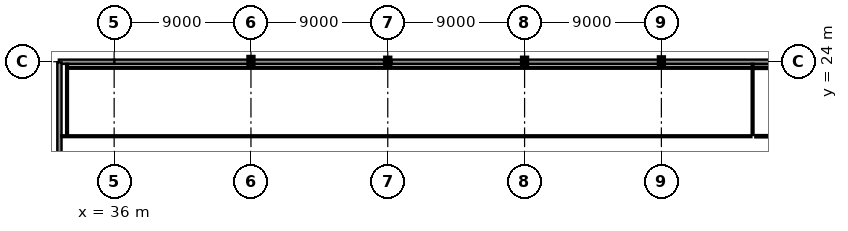
"""IFC4 building model, lengths in metres.
Left out: names, types, materials, properties, quantities, classifications, styles, units other than length and angle.
Written with IfcOpenShell. Run it as: python <this file> out.ifc"""

import sys

from ifc_helpers import new_model, si_unit, direction, frame, frame_2d, origin, origin_2d, place, context, subcontext, project, spatial, rectangle, i_section, extrude, element, fill, save


model = new_model("IFC4")
c1 = context("Model", 3, precision=1e-05, world=origin(), true_north=direction((0.0, 1.0)))
c2 = subcontext(c1, "Body", "Model", "MODEL_VIEW")
j1 = project(units=[si_unit("LENGTHUNIT", "METRE"), si_unit("PLANEANGLEUNIT", "RADIAN")], contexts=[c1])
p1 = place(None, origin())
s1 = spatial("IfcSite", under=j1, at=p1, CompositionType="ELEMENT")
p2 = place(p1, origin())
s2 = spatial("IfcBuilding", under=s1, at=p2, CompositionType="ELEMENT")
p3 = place(p2, frame((0.0, 0.0, 27.4)))
s3 = spatial("IfcBuildingStorey", under=s2, at=p3, CompositionType="ELEMENT", Elevation=27.4)
p4 = place(p3, frame((45.0, 24.0, 0.0), z_axis=(0.0, 0.0, 1.0), x_axis=(1.0, 0.0, 0.0)))
e1 = element("IfcColumn", 1, at=p4, inside=s3, PredefinedType="COLUMN", context=c2, shape_type="SweptSolid", body=[
    extrude(i_section(OverallWidth=0.3, OverallDepth=0.6, WebThickness=0.015, FlangeThickness=0.03, at=origin_2d()), origin(), (0.0, 0.0, 1.0), 4.0),
])
for number, where, z_axis, x_axis in (
    (2, (54.0, 24.0, 0.0), (0.0, 0.0, 1.0), (0.0, 1.0, 0.0)),
    (3, (63.0, 24.0, 0.0), (0.0, 0.0, 1.0), (1.0, 0.0, 0.0)),
):
    element("IfcColumn", number, at=place(p3, frame(where, z_axis=z_axis, x_axis=x_axis)), inside=s3, PredefinedType="COLUMN", context=c2, shape_type="SweptSolid", body=[
        extrude(i_section(OverallWidth=0.3, OverallDepth=0.5, WebThickness=0.014, FlangeThickness=0.028, at=origin_2d()), origin(), (0.0, 0.0, 1.0), 4.0),
    ])
p5 = place(p3, frame((72.0, 24.0, 0.0), z_axis=(0.0, 0.0, 1.0), x_axis=(1.0, 0.0, 0.0)))
e4 = element("IfcColumn", 4, at=p5, inside=s3, PredefinedType="COLUMN", context=c2, shape_type="SweptSolid", body=[
    extrude(i_section(OverallWidth=0.3, OverallDepth=0.55, WebThickness=0.015, FlangeThickness=0.029, at=origin_2d()), origin(), (0.0, 0.0, 1.0), 4.0),
])
p6 = place(p3, frame((80.942, 24.0, 0.0), z_axis=(0.0, 0.0, 1.0), x_axis=(-1.0, 0.0, 0.0)))
e5 = element("IfcWall", 5, at=p6, inside=s3, PredefinedType="SOLIDWALL", context=c2, shape_type="SweptSolid", body=[
    extrude(rectangle(XDim=8.934, YDim=0.28, at=frame_2d((4.467, 0.0))), origin(), (0.0, 0.0, 1.0), 3.305),
])
p7 = place(p6, frame((1.302, 0.0, 1.05)))
e6 = element("IfcOpeningElement", 6, at=p7, cuts=e5, PredefinedType="OPENING", context=c2, shape_type="SweptSolid", body=[
    extrude(rectangle(XDim=1.3, YDim=1.3, at=frame_2d((0.65, 0.65))), frame((0.0, 0.155, 0.0), z_axis=(0.0, -1.0, 0.0), x_axis=(1.0, 0.0, 0.0)), (0.0, 0.0, 1.0), 0.31),
])
p8 = place(p6, frame((5.604, 0.0, 1.05)))
e7 = element("IfcOpeningElement", 7, at=p8, cuts=e5, PredefinedType="OPENING", context=c2, shape_type="SweptSolid", body=[
    extrude(rectangle(XDim=1.3, YDim=1.3, at=frame_2d((0.65, 0.65))), frame((0.0, 0.155, 0.0), z_axis=(0.0, -1.0, 0.0), x_axis=(1.0, 0.0, 0.0)), (0.0, 0.0, 1.0), 0.31),
])
p9 = place(p3, frame((71.992, 24.0, 0.0), z_axis=(0.0, 0.0, 1.0), x_axis=(-1.0, 0.0, 0.0)))
e8 = element("IfcWall", 8, at=p9, inside=s3, PredefinedType="SOLIDWALL", context=c2, shape_type="SweptSolid", body=[
    extrude(rectangle(XDim=8.984, YDim=0.28, at=frame_2d((4.492, 0.0))), origin(), (0.0, 0.0, 1.0), 2.787),
])
p10 = place(p9, frame((2.045, 0.0, 1.05)))
e9 = element("IfcOpeningElement", 9, at=p10, cuts=e8, PredefinedType="OPENING", context=c2, shape_type="SweptSolid", body=[
    extrude(rectangle(XDim=1.3, YDim=1.3, at=frame_2d((0.65, 0.65))), frame((0.0, 0.155, 0.0), z_axis=(0.0, -1.0, 0.0), x_axis=(1.0, 0.0, 0.0)), (0.0, 0.0, 1.0), 0.31),
])
p11 = place(p9, frame((5.639, 0.0, 1.05)))
e10 = element("IfcOpeningElement", 10, at=p11, cuts=e8, PredefinedType="OPENING", context=c2, shape_type="SweptSolid", body=[
    extrude(rectangle(XDim=1.3, YDim=1.3, at=frame_2d((0.65, 0.65))), frame((0.0, 0.155, 0.0), z_axis=(0.0, -1.0, 0.0), x_axis=(1.0, 0.0, 0.0)), (0.0, 0.0, 1.0), 0.31),
])
p12 = place(p3, frame((62.992, 24.0, 0.0), z_axis=(0.0, 0.0, 1.0), x_axis=(-1.0, 0.0, 0.0)))
e11 = element("IfcWall", 11, at=p12, inside=s3, PredefinedType="SOLIDWALL", context=c2, shape_type="SweptSolid", body=[
    extrude(rectangle(XDim=8.744, YDim=0.28, at=frame_2d((4.372, 0.0))), origin(), (0.0, 0.0, 1.0), 2.787),
])
p13 = place(p12, frame((1.973, 0.0, 1.05)))
e12 = element("IfcOpeningElement", 12, at=p13, cuts=e11, PredefinedType="OPENING", context=c2, shape_type="SweptSolid", body=[
    extrude(rectangle(XDim=1.3, YDim=1.3, at=frame_2d((0.65, 0.65))), frame((0.0, 0.155, 0.0), z_axis=(0.0, -1.0, 0.0), x_axis=(1.0, 0.0, 0.0)), (0.0, 0.0, 1.0), 0.31),
])
p14 = place(p12, frame((5.471, 0.0, 1.05)))
e13 = element("IfcOpeningElement", 13, at=p14, cuts=e11, PredefinedType="OPENING", context=c2, shape_type="SweptSolid", body=[
    extrude(rectangle(XDim=1.3, YDim=1.3, at=frame_2d((0.65, 0.65))), frame((0.0, 0.155, 0.0), z_axis=(0.0, -1.0, 0.0), x_axis=(1.0, 0.0, 0.0)), (0.0, 0.0, 1.0), 0.31),
])
p15 = place(p3, frame((53.752, 24.0, 0.0), z_axis=(0.0, 0.0, 1.0), x_axis=(-1.0, 0.0, 0.0)))
e14 = element("IfcWall", 14, at=p15, inside=s3, PredefinedType="SOLIDWALL", context=c2, shape_type="SweptSolid", body=[
    extrude(rectangle(XDim=8.744, YDim=0.28, at=frame_2d((4.372, 0.0))), origin(), (0.0, 0.0, 1.0), 2.787),
])
p16 = place(p15, frame((1.973, 0.0, 1.05)))
e15 = element("IfcOpeningElement", 15, at=p16, cuts=e14, PredefinedType="OPENING", context=c2, shape_type="SweptSolid", body=[
    extrude(rectangle(XDim=1.3, YDim=1.3, at=frame_2d((0.65, 0.65))), frame((0.0, 0.155, 0.0), z_axis=(0.0, -1.0, 0.0), x_axis=(1.0, 0.0, 0.0)), (0.0, 0.0, 1.0), 0.31),
])
p17 = place(p15, frame((5.471, 0.0, 1.05)))
e16 = element("IfcOpeningElement", 16, at=p17, cuts=e14, PredefinedType="OPENING", context=c2, shape_type="SweptSolid", body=[
    extrude(rectangle(XDim=1.3, YDim=1.3, at=frame_2d((0.65, 0.65))), frame((0.0, 0.155, 0.0), z_axis=(0.0, -1.0, 0.0), x_axis=(1.0, 0.0, 0.0)), (0.0, 0.0, 1.0), 0.31),
])
p18 = place(p3, frame((44.992, 24.0, 0.0), z_axis=(0.0, 0.0, 1.0), x_axis=(-1.0, 0.0, 0.0)))
e17 = element("IfcWall", 17, at=p18, inside=s3, PredefinedType="SOLIDWALL", context=c2, shape_type="SweptSolid", body=[
    extrude(rectangle(XDim=9.002, YDim=0.28, at=frame_2d((4.501, 0.0))), origin(), (0.0, 0.0, 1.0), 2.787),
])
p19 = place(p3, frame((36.01, 24.0, 0.0), z_axis=(0.0, 0.0, 1.0), x_axis=(-1.0, 0.0, 0.0)))
e18 = element("IfcWall", 18, at=p19, inside=s3, PredefinedType="SOLIDWALL", context=c2, shape_type="SweptSolid", body=[
    extrude(rectangle(XDim=3.65, YDim=0.28, at=frame_2d((1.825, 0.0))), origin(), (0.0, 0.0, 1.0), 2.787),
])
p20 = place(p3, frame((32.4, 23.96, 0.0), z_axis=(0.0, 0.0, 1.0), x_axis=(0.0, -1.0, 0.0)))
e19 = element("IfcWall", 19, at=p20, inside=s3, PredefinedType="SOLIDWALL", context=c2, shape_type="SweptSolid", body=[
    extrude(rectangle(XDim=11.97, YDim=0.28, at=frame_2d((5.985, 0.0))), origin(), (0.0, 0.0, 1.0), 3.095),
])
p21 = place(p20, frame((2.941, 0.0, 1.05)))
e20 = element("IfcOpeningElement", 20, at=p21, cuts=e19, PredefinedType="OPENING", context=c2, shape_type="SweptSolid", body=[
    extrude(rectangle(XDim=1.3, YDim=1.3, at=frame_2d((0.65, 0.65))), frame((0.0, 0.155, 0.0), z_axis=(0.0, -1.0, 0.0), x_axis=(1.0, 0.0, 0.0)), (0.0, 0.0, 1.0), 0.31),
])
p22 = place(p20, frame((8.5, 0.0, 1.05)))
e21 = element("IfcOpeningElement", 21, at=p22, cuts=e19, PredefinedType="OPENING", context=c2, shape_type="SweptSolid", body=[
    extrude(rectangle(XDim=1.3, YDim=1.3, at=frame_2d((0.65, 0.65))), frame((0.0, 0.155, 0.0), z_axis=(0.0, -1.0, 0.0), x_axis=(1.0, 0.0, 0.0)), (0.0, 0.0, 1.0), 0.31),
])
p23 = place(p3, frame((77.92, 19.1, 0.0), z_axis=(0.0, 0.0, 1.0), x_axis=(-1.0, 0.0, 0.0)))
e22 = element("IfcWall", 22, at=p23, inside=s3, PredefinedType="PARTITIONING", context=c2, shape_type="SweptSolid", body=[
    extrude(rectangle(XDim=45.385, YDim=0.12, at=frame_2d((22.692, 0.0))), origin(), (0.0, 0.0, 1.0), 3.64),
])
p24 = place(p23, frame((22.218, 0.0, 0.0)))
e23 = element("IfcOpeningElement", 23, at=p24, cuts=e22, PredefinedType="OPENING", context=c2, shape_type="SweptSolid", body=[
    extrude(rectangle(XDim=0.95, YDim=2.15, at=frame_2d((0.475, 1.075))), frame((0.0, 0.075, 0.0), z_axis=(0.0, -1.0, 0.0), x_axis=(1.0, 0.0, 0.0)), (0.0, 0.0, 1.0), 0.15),
])
p25 = place(p3, frame((32.9, 19.155, 0.0), z_axis=(0.0, 0.0, 1.0), x_axis=(0.0, 1.0, 0.0)))
e24 = element("IfcWall", 24, at=p25, inside=s3, PredefinedType="PARTITIONING", context=c2, shape_type="SweptSolid", body=[
    extrude(rectangle(XDim=4.71, YDim=0.12, at=frame_2d((2.355, 0.0))), origin(), (0.0, 0.0, 1.0), 3.64),
])
p26 = place(p3, frame((32.955, 23.6, 0.0), z_axis=(0.0, 0.0, 1.0), x_axis=(1.0, 0.0, 0.0)))
e25 = element("IfcWall", 25, at=p26, inside=s3, PredefinedType="PARTITIONING", context=c2, shape_type="SweptSolid", body=[
    extrude(rectangle(XDim=44.965, YDim=0.12, at=frame_2d((22.482, 0.0))), origin(), (0.0, 0.0, 1.0), 3.64),
])
p27 = place(p3, frame((78.0, 23.865, 0.0), z_axis=(0.0, 0.0, 1.0), x_axis=(0.0, -1.0, 0.0)))
e26 = element("IfcWall", 26, at=p27, inside=s3, PredefinedType="PARTITIONING", context=c2, shape_type="SweptSolid", body=[
    extrude(rectangle(XDim=4.685, YDim=0.12, at=frame_2d((2.343, 0.0))), origin(), (0.0, 0.0, 1.0), 3.64),
])
p28 = place(p3, frame((78.055, 23.6, 0.0), z_axis=(0.0, 0.0, 1.0), x_axis=(1.0, 0.0, 0.0)))
e27 = element("IfcWall", 27, at=p28, inside=s3, PredefinedType="PARTITIONING", context=c2, shape_type="SweptSolid", body=[
    extrude(rectangle(XDim=25.865, YDim=0.15, at=frame_2d((12.933, 0.0))), origin(), (0.0, 0.0, 1.0), 3.64),
])
p29 = place(p3, frame((103.92, 19.1, 0.0), z_axis=(0.0, 0.0, 1.0), x_axis=(-1.0, 0.0, 0.0)))
e28 = element("IfcWall", 28, at=p29, inside=s3, PredefinedType="PARTITIONING", context=c2, shape_type="SweptSolid", body=[
    extrude(rectangle(XDim=25.74, YDim=0.15, at=frame_2d((12.87, 0.0))), origin(), (0.0, 0.0, 1.0), 3.64),
])
p30 = place(p29, frame((12.345, 0.0, 0.0)))
e29 = element("IfcOpeningElement", 29, at=p30, cuts=e28, PredefinedType="OPENING", context=c2, shape_type="SweptSolid", body=[
    extrude(rectangle(XDim=1.05, YDim=2.25, at=frame_2d((0.525, 1.125))), frame((0.0, 0.09, 0.0), z_axis=(0.0, -1.0, 0.0), x_axis=(1.0, 0.0, 0.0)), (0.0, 0.0, 1.0), 0.18),
])
p31 = place(p7, origin())
e30 = element("IfcWindow", 30, at=p31, inside=s3, PartitioningType="SINGLE_PANEL", PredefinedType="WINDOW", context=c2, shape_type="SweptSolid", body=[
    extrude(rectangle(XDim=1.3, YDim=1.3, at=frame_2d((0.65, 0.65))), frame((0.0, 0.03, 0.0), z_axis=(0.0, -1.0, 0.0), x_axis=(1.0, 0.0, 0.0)), (0.0, 0.0, 1.0), 0.06),
])
fill(e6, e30)
p32 = place(p8, origin())
e31 = element("IfcWindow", 31, at=p32, inside=s3, PartitioningType="SINGLE_PANEL", PredefinedType="WINDOW", context=c2, shape_type="SweptSolid", body=[
    extrude(rectangle(XDim=1.3, YDim=1.3, at=frame_2d((0.65, 0.65))), frame((0.0, 0.03, 0.0), z_axis=(0.0, -1.0, 0.0), x_axis=(1.0, 0.0, 0.0)), (0.0, 0.0, 1.0), 0.06),
])
fill(e7, e31)
p33 = place(p10, origin())
e32 = element("IfcWindow", 32, at=p33, inside=s3, PartitioningType="SINGLE_PANEL", PredefinedType="WINDOW", context=c2, shape_type="SweptSolid", body=[
    extrude(rectangle(XDim=1.3, YDim=1.3, at=frame_2d((0.65, 0.65))), frame((0.0, 0.03, 0.0), z_axis=(0.0, -1.0, 0.0), x_axis=(1.0, 0.0, 0.0)), (0.0, 0.0, 1.0), 0.06),
])
fill(e9, e32)
p34 = place(p11, origin())
e33 = element("IfcWindow", 33, at=p34, inside=s3, PartitioningType="SINGLE_PANEL", PredefinedType="WINDOW", context=c2, shape_type="SweptSolid", body=[
    extrude(rectangle(XDim=1.3, YDim=1.3, at=frame_2d((0.65, 0.65))), frame((0.0, 0.03, 0.0), z_axis=(0.0, -1.0, 0.0), x_axis=(1.0, 0.0, 0.0)), (0.0, 0.0, 1.0), 0.06),
])
fill(e10, e33)
p35 = place(p13, origin())
e34 = element("IfcWindow", 34, at=p35, inside=s3, PartitioningType="SINGLE_PANEL", PredefinedType="WINDOW", context=c2, shape_type="SweptSolid", body=[
    extrude(rectangle(XDim=1.3, YDim=1.3, at=frame_2d((0.65, 0.65))), frame((0.0, 0.03, 0.0), z_axis=(0.0, -1.0, 0.0), x_axis=(1.0, 0.0, 0.0)), (0.0, 0.0, 1.0), 0.06),
])
fill(e12, e34)
p36 = place(p14, origin())
e35 = element("IfcWindow", 35, at=p36, inside=s3, PartitioningType="SINGLE_PANEL", PredefinedType="WINDOW", context=c2, shape_type="SweptSolid", body=[
    extrude(rectangle(XDim=1.3, YDim=1.3, at=frame_2d((0.65, 0.65))), frame((0.0, 0.03, 0.0), z_axis=(0.0, -1.0, 0.0), x_axis=(1.0, 0.0, 0.0)), (0.0, 0.0, 1.0), 0.06),
])
fill(e13, e35)
p37 = place(p16, origin())
e36 = element("IfcWindow", 36, at=p37, inside=s3, PartitioningType="SINGLE_PANEL", PredefinedType="WINDOW", context=c2, shape_type="SweptSolid", body=[
    extrude(rectangle(XDim=1.3, YDim=1.3, at=frame_2d((0.65, 0.65))), frame((0.0, 0.03, 0.0), z_axis=(0.0, -1.0, 0.0), x_axis=(1.0, 0.0, 0.0)), (0.0, 0.0, 1.0), 0.06),
])
fill(e15, e36)
p38 = place(p17, origin())
e37 = element("IfcWindow", 37, at=p38, inside=s3, PartitioningType="SINGLE_PANEL", PredefinedType="WINDOW", context=c2, shape_type="SweptSolid", body=[
    extrude(rectangle(XDim=1.3, YDim=1.3, at=frame_2d((0.65, 0.65))), frame((0.0, 0.03, 0.0), z_axis=(0.0, -1.0, 0.0), x_axis=(1.0, 0.0, 0.0)), (0.0, 0.0, 1.0), 0.06),
])
fill(e16, e37)
p39 = place(p21, origin())
e38 = element("IfcWindow", 38, at=p39, inside=s3, PartitioningType="SINGLE_PANEL", PredefinedType="WINDOW", context=c2, shape_type="SweptSolid", body=[
    extrude(rectangle(XDim=1.3, YDim=1.3, at=frame_2d((0.65, 0.65))), frame((0.0, 0.03, 0.0), z_axis=(0.0, -1.0, 0.0), x_axis=(1.0, 0.0, 0.0)), (0.0, 0.0, 1.0), 0.06),
])
fill(e20, e38)
p40 = place(p24, frame((0.95, 0.0, 0.0), z_axis=(0.0, 0.0, 1.0), x_axis=(-1.0, 0.0, 0.0)))
e39 = element("IfcDoor", 39, at=p40, inside=s3, OperationType="SINGLE_SWING_RIGHT", PredefinedType="DOOR", context=c2, shape_type="SweptSolid", body=[
    extrude(rectangle(XDim=0.95, YDim=2.15, at=frame_2d((0.475, 1.075))), frame((0.0, 0.025, 0.0), z_axis=(0.0, -1.0, 0.0), x_axis=(1.0, 0.0, 0.0)), (0.0, 0.0, 1.0), 0.05),
])
fill(e23, e39)
save(model, sys.argv[1])
